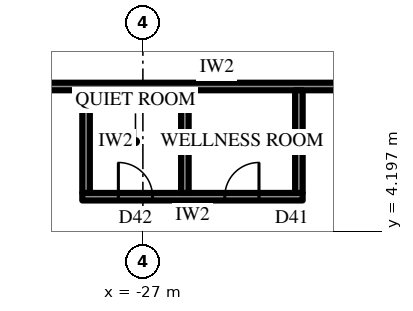
"""IFC4 building model, lengths in metres.
Left out: names, types, materials, properties, quantities, classifications, styles, units other than length and angle.
Written with IfcOpenShell. Run it as: python <this file> out.ifc"""

import sys

from ifc_helpers import new_model, si_unit, direction, frame, frame_2d, origin, place, context, subcontext, project, spatial, rectangle, extrude, element, fill, save


model = new_model("IFC4")
c1 = context("Model", 3, precision=1e-05, world=origin(), true_north=direction((0.0, 1.0)))
c2 = subcontext(c1, "Body", "Model", "MODEL_VIEW")
j1 = project(units=[si_unit("LENGTHUNIT", "METRE"), si_unit("PLANEANGLEUNIT", "RADIAN")], contexts=[c1])
p1 = place(None, origin())
s1 = spatial("IfcSite", under=j1, at=p1, CompositionType="ELEMENT")
p2 = place(p1, origin())
s2 = spatial("IfcBuilding", under=s1, at=p2, CompositionType="ELEMENT")
p3 = place(p2, frame((0.0, 0.0, 144.7)))
s3 = spatial("IfcBuildingStorey", under=s2, at=p3, CompositionType="ELEMENT", Elevation=144.7)
p4 = place(p3, frame((-18.6, 8.0, 0.0), z_axis=(0.0, 0.0, 1.0), x_axis=(-1.0, 0.0, 0.0)))
e1 = element("IfcWall", 1, at=p4, inside=s3, PredefinedType="PARTITIONING", context=c2, shape_type="SweptSolid", body=[
    extrude(rectangle(XDim=12.9, YDim=0.2, at=frame_2d((6.45, 0.0))), origin(), (0.0, 0.0, 1.0), 4.0),
])
p5 = place(p4, frame((0.79, 0.0, 0.0)))
e2 = element("IfcOpeningElement", 2, at=p5, cuts=e1, PredefinedType="OPENING", context=c2, shape_type="SweptSolid", body=[
    extrude(rectangle(XDim=1.0, YDim=2.2, at=frame_2d((0.5, 1.1))), frame((0.0, 0.11, 0.0), z_axis=(0.0, -1.0, 0.0), x_axis=(1.0, 0.0, 0.0)), (0.0, 0.0, 1.0), 0.22),
])
p6 = place(p3, frame((-22.795, 5.1, 0.0), z_axis=(0.0, 0.0, 1.0), x_axis=(-1.0, 0.0, 0.0)))
e3 = element("IfcWall", 3, at=p6, inside=s3, PredefinedType="PARTITIONING", context=c2, shape_type="SweptSolid", body=[
    extrude(rectangle(XDim=5.8, YDim=0.2, at=frame_2d((2.9, 0.0))), origin(), (0.0, 0.0, 1.0), 4.0),
])
p7 = place(p6, frame((1.15, 0.0, 0.0)))
e4 = element("IfcOpeningElement", 4, at=p7, cuts=e3, PredefinedType="OPENING", context=c2, shape_type="SweptSolid", body=[
    extrude(rectangle(XDim=0.9, YDim=2.2, at=frame_2d((0.45, 1.1))), frame((0.0, 0.11, 0.0), z_axis=(0.0, -1.0, 0.0), x_axis=(1.0, 0.0, 0.0)), (0.0, 0.0, 1.0), 0.22),
])
p8 = place(p6, frame((3.95, 0.0, 0.0)))
e5 = element("IfcOpeningElement", 5, at=p8, cuts=e3, PredefinedType="OPENING", context=c2, shape_type="SweptSolid", body=[
    extrude(rectangle(XDim=0.9, YDim=2.2, at=frame_2d((0.45, 1.1))), frame((0.0, 0.11, 0.0), z_axis=(0.0, -1.0, 0.0), x_axis=(1.0, 0.0, 0.0)), (0.0, 0.0, 1.0), 0.22),
])
for number, where, z_axis, x_axis in (
    (6, (-22.895, 7.9, 0.0), (0.0, 0.0, 1.0), (0.0, -1.0, 0.0)),
    (7, (-25.895, 7.9, 0.0), (0.0, 0.0, 1.0), (0.0, -1.0, 0.0)),
    (8, (-28.495, 7.9, 0.0), (0.0, 0.0, 1.0), (0.0, -1.0, 0.0)),
):
    element("IfcWall", number, at=place(p3, frame(where, z_axis=z_axis, x_axis=x_axis)), inside=s3, PredefinedType="PARTITIONING", context=c2, shape_type="SweptSolid", body=[
        extrude(rectangle(XDim=2.7, YDim=0.2, at=frame_2d((1.35, 0.0))), origin(), (0.0, 0.0, 1.0), 4.0),
    ])
p9 = place(p7, frame((0.9, 0.0, 0.0), z_axis=(0.0, 0.0, 1.0), x_axis=(-1.0, 0.0, 0.0)))
e9 = element("IfcDoor", 9, at=p9, inside=s3, OperationType="SINGLE_SWING_LEFT", PredefinedType="DOOR", context=c2, shape_type="SweptSolid", body=[
    extrude(rectangle(XDim=0.9, YDim=2.2, at=frame_2d((0.45, 1.1))), frame((0.0, 0.025, 0.0), z_axis=(0.0, -1.0, 0.0), x_axis=(1.0, 0.0, 0.0)), (0.0, 0.0, 1.0), 0.05),
])
fill(e4, e9)
p10 = place(p8, frame((0.9, 0.0, 0.0), z_axis=(0.0, 0.0, 1.0), x_axis=(-1.0, 0.0, 0.0)))
e10 = element("IfcDoor", 10, at=p10, inside=s3, OperationType="SINGLE_SWING_RIGHT", PredefinedType="DOOR", context=c2, shape_type="SweptSolid", body=[
    extrude(rectangle(XDim=0.9, YDim=2.2, at=frame_2d((0.45, 1.1))), frame((0.0, 0.025, 0.0), z_axis=(0.0, -1.0, 0.0), x_axis=(1.0, 0.0, 0.0)), (0.0, 0.0, 1.0), 0.05),
])
fill(e5, e10)
save(model, sys.argv[1])
